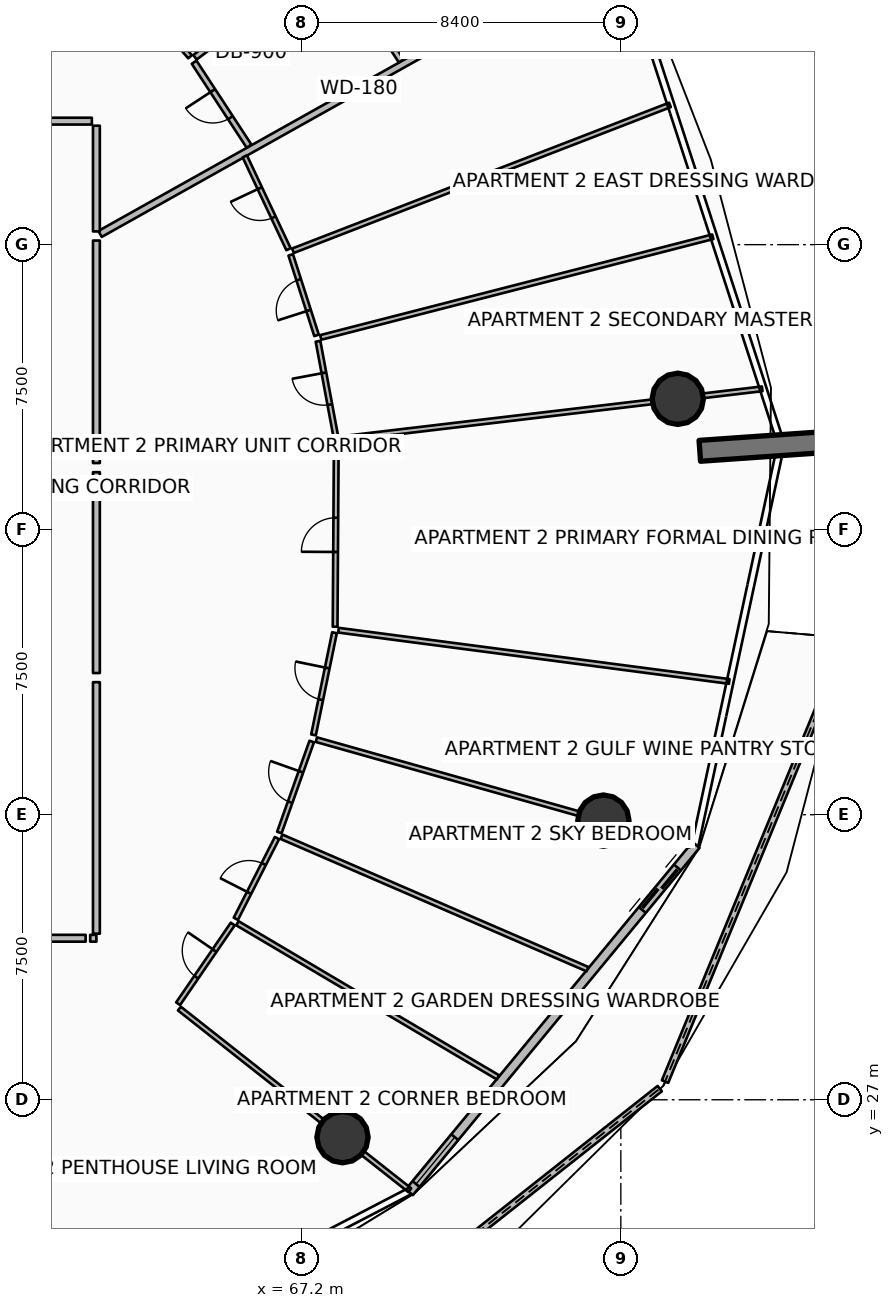
"""IFC4 building model, lengths in metres.
Left out: names, types, materials, properties, quantities, classifications, styles, units other than length and angle.
Written with IfcOpenShell. Run it as: python <this file> out.ifc"""

import sys

from ifc_helpers import new_model, si_unit, direction, frame, frame_2d, origin, origin_2d, place, context, subcontext, project, spatial, polyline, rectangle, circle, outline, extrude, element, fill, save


model = new_model("IFC4")
c1 = context("Model", 3, precision=1e-05, world=origin(), true_north=direction((0.0, 1.0)))
c2 = subcontext(c1, "Body", "Model", "MODEL_VIEW")
j1 = project(units=[si_unit("LENGTHUNIT", "METRE"), si_unit("PLANEANGLEUNIT", "RADIAN")], contexts=[c1])
p1 = place(None, origin())
s1 = spatial("IfcSite", under=j1, at=p1, CompositionType="ELEMENT")
p2 = place(p1, origin())
s2 = spatial("IfcBuilding", under=s1, at=p2, CompositionType="ELEMENT")
p3 = place(p2, frame((0.0, 0.0, 33.9)))
s3 = spatial("IfcBuildingStorey", under=s2, at=p3, CompositionType="ELEMENT", Elevation=33.9)
p4 = place(p3, frame((77.678, 44.075, 0.0), z_axis=(0.0, 0.0, 1.0), x_axis=(0.997564163539, 0.069754853754, 0.0)))
e1 = element("IfcWall", 1, at=p4, inside=s3, PredefinedType="SOLIDWALL", context=c2, shape_type="SweptSolid", body=[
    extrude(rectangle(XDim=3.5, YDim=0.55, at=frame_2d((1.75, 0.0))), origin(), (0.0, 0.0, 1.0), 3.75),
])
for number, where, z_axis, x_axis in (
    (2, (68.276, 26.016, 0.0), (0.0, 0.0, 1.0), (1.0, 0.0, 0.0)),
    (3, (75.141, 34.345, 0.0), (0.0, 0.0, 1.0), (1.0, 0.0, 0.0)),
    (4, (77.098, 45.444, 0.0), (0.0, 0.0, 1.0), (1.0, 0.0, 0.0)),
):
    element("IfcColumn", number, at=place(p3, frame(where, z_axis=z_axis, x_axis=x_axis)), inside=s3, PredefinedType="COLUMN", context=c2, shape_type="SweptSolid", body=[
        extrude(circle(Radius=0.675, at=origin_2d()), origin(), (0.0, 0.0, 1.0), 3.5),
    ])
p5 = place(p3, frame((67.172, 19.829, 0.0), z_axis=(0.0, 0.0, 1.0), x_axis=(0.784771193171, 0.619785587416, 0.0)))
e5 = element("IfcWall", 5, at=p5, inside=s3, PredefinedType="PARAPET", context=c2, shape_type="SweptSolid", body=[
    extrude(outline(polyline([(0.0, 0.0), (12.044, 0.0), (12.044, 1.832), (6.022, 1.853), (0.0, 1.756), (0.0, 0.0)])), frame((0.0, 0.09, 0.0), z_axis=(0.0, -1.0, 0.0), x_axis=(1.0, 0.0, 0.0)), (0.0, 0.0, 1.0), 0.18),
])
p6 = place(p3, frame((76.763, 27.479, 0.0), z_axis=(0.0, 0.0, 1.0), x_axis=(0.381082407016, 0.924541074838, 0.0)))
e6 = element("IfcWall", 6, at=p6, inside=s3, PredefinedType="PARAPET", context=c2, shape_type="SweptSolid", body=[
    extrude(outline(polyline([(0.0, 0.0), (12.625, 0.0), (12.625, 1.497), (6.312, 1.696), (0.0, 1.832), (0.0, 0.0)])), frame((0.0, 0.09, 0.0), z_axis=(0.0, -1.0, 0.0), x_axis=(1.0, 0.0, 0.0)), (0.0, 0.0, 1.0), 0.18),
])
p7 = place(p3, frame((70.033, 24.567, 0.0), z_axis=(0.0, 0.0, 1.0), x_axis=(0.636674332663, 0.771132799281, 0.0)))
e7 = element("IfcWall", 7, at=p7, inside=s3, PredefinedType="SOLIDWALL", context=c2, shape_type="SweptSolid", body=[
    extrude(rectangle(XDim=11.851, YDim=0.24, at=frame_2d((5.926, 0.0))), origin(), (0.0, 0.0, 1.0), 2.45),
])
p8 = place(p7, frame((9.631, 0.0, 0.0)))
e8 = element("IfcOpeningElement", 8, at=p8, cuts=e7, PredefinedType="OPENING", context=c2, shape_type="SweptSolid", body=[
    extrude(rectangle(XDim=1.45, YDim=2.15, at=frame_2d((0.725, 1.075))), frame((0.0, 0.13, 0.0), z_axis=(0.0, -1.0, 0.0), x_axis=(1.0, 0.0, 0.0)), (0.0, 0.0, 1.0), 0.26),
])
p9 = place(p7, frame((0.28, 0.0, 0.65)))
e9 = element("IfcOpeningElement", 9, at=p9, cuts=e7, PredefinedType="OPENING", context=c2, shape_type="SweptSolid", body=[
    extrude(rectangle(XDim=1.6, YDim=1.5, at=frame_2d((0.8, 0.75))), frame((0.0, 0.13, 0.0), z_axis=(0.0, -1.0, 0.0), x_axis=(1.0, 0.0, 0.0)), (0.0, 0.0, 1.0), 0.26),
])
p10 = place(p3, frame((61.896, 49.782, 0.0), z_axis=(0.0, 0.0, 1.0), x_axis=(0.872493215695, 0.488626225828, 0.0)))
e10 = element("IfcWall", 10, at=p10, inside=s3, PredefinedType="PARTITIONING", context=c2, shape_type="SweptSolid", body=[
    extrude(rectangle(XDim=15.612, YDim=0.18, at=frame_2d((7.806, 0.0))), origin(), (0.0, 0.0, 1.0), 2.867),
])
p11 = place(p3, frame((61.8, 49.848, 0.0), z_axis=(0.0, 0.0, 1.0), x_axis=(0.0, 1.0, 0.0)))
e11 = element("IfcWall", 11, at=p11, inside=s3, PredefinedType="PARTITIONING", context=c2, shape_type="SweptSolid", body=[
    extrude(rectangle(XDim=2.781, YDim=0.18, at=frame_2d((1.391, 0.0))), origin(), (0.0, 0.0, 1.0), 2.867),
])
p12 = place(p3, frame((61.68, 52.75, 0.0), z_axis=(0.0, 0.0, 1.0), x_axis=(-1.0, 0.0, 0.0)))
e12 = element("IfcWall", 12, at=p12, inside=s3, PredefinedType="PARTITIONING", context=c2, shape_type="SweptSolid", body=[
    extrude(rectangle(XDim=5.085, YDim=0.18, at=frame_2d((2.543, 0.0))), origin(), (0.0, 0.0, 1.0), 2.867),
])
p13 = place(p3, frame((65.816, 52.092, 0.0), z_axis=(0.0, 0.0, 1.0), x_axis=(-0.547635625156, 0.836716930664, 0.0)))
e13 = element("IfcWall", 13, at=p13, inside=s3, PredefinedType="PARTITIONING", context=c2, shape_type="SweptSolid", body=[
    extrude(rectangle(XDim=2.639, YDim=0.15, at=frame_2d((1.32, 0.0))), origin(), (0.0, 0.0, 1.0), 2.867),
])
p14 = place(p13, frame((0.895, 0.0, 0.0)))
e14 = element("IfcOpeningElement", 14, at=p14, cuts=e13, PredefinedType="OPENING", context=c2, shape_type="SweptSolid", body=[
    extrude(rectangle(XDim=0.85, YDim=2.06, at=frame_2d((0.425, 1.03))), frame((0.0, 0.085, 0.0), z_axis=(0.0, -1.0, 0.0), x_axis=(1.0, 0.0, 0.0)), (0.0, 0.0, 1.0), 0.17),
])
p15 = place(p3, frame((69.821, 54.335, 0.0), z_axis=(0.0, 0.0, 1.0), x_axis=(-0.547709492592, 0.836668579382, 0.0)))
e15 = element("IfcWall", 15, at=p15, inside=s3, PredefinedType="PARTITIONING", context=c2, shape_type="SweptSolid", body=[
    extrude(rectangle(XDim=3.273, YDim=0.15, at=frame_2d((1.637, 0.0))), origin(), (0.0, 0.0, 1.0), 2.867),
])
p16 = place(p3, frame((64.394, 54.43, 0.0), z_axis=(0.0, 0.0, 1.0), x_axis=(0.796855751732, 0.604169604442, 0.0)))
e16 = element("IfcWall", 16, at=p16, inside=s3, PredefinedType="PARTITIONING", context=c2, shape_type="SweptSolid", body=[
    extrude(rectangle(XDim=4.46, YDim=0.15, at=frame_2d((2.23, 0.0))), origin(), (0.0, 0.0, 1.0), 2.94),
])
p17 = place(p3, frame((64.263, 54.444, 0.0), z_axis=(0.0, 0.0, 1.0), x_axis=(-0.651227570151, 0.758882502022, 0.0)))
e17 = element("IfcWall", 17, at=p17, inside=s3, PredefinedType="PARTITIONING", context=c2, shape_type="SweptSolid", body=[
    extrude(rectangle(XDim=2.304, YDim=0.125, at=frame_2d((1.152, 0.0))), origin(), (0.0, 0.0, 1.0), 2.94),
])
p18 = place(p17, frame((0.727, 0.0, 0.0)))
e18 = element("IfcOpeningElement", 18, at=p18, cuts=e17, PredefinedType="OPENING", context=c2, shape_type="SweptSolid", body=[
    extrude(rectangle(XDim=0.85, YDim=2.06, at=frame_2d((0.425, 1.03))), frame((0.0, 0.073, 0.0), z_axis=(0.0, -1.0, 0.0), x_axis=(1.0, 0.0, 0.0)), (0.0, 0.0, 1.0), 0.145),
])
p19 = place(p3, frame((54.14, 31.25, 0.0), z_axis=(0.0, 0.0, 1.0), x_axis=(1.0, 0.0, 0.0)))
e19 = element("IfcWall", 19, at=p19, inside=s3, PredefinedType="PARTITIONING", context=c2, shape_type="SweptSolid", body=[
    extrude(rectangle(XDim=7.376, YDim=0.18, at=frame_2d((3.688, 0.0))), origin(), (0.0, 0.0, 1.0), 2.867),
])
p20 = place(p19, frame((3.138, 0.0, 0.0)))
e20 = element("IfcOpeningElement", 20, at=p20, cuts=e19, PredefinedType="OPENING", context=c2, shape_type="SweptSolid", body=[
    extrude(rectangle(XDim=1.1, YDim=2.1, at=frame_2d((0.55, 1.05))), frame((0.0, 0.1, 0.0), z_axis=(0.0, -1.0, 0.0), x_axis=(1.0, 0.0, 0.0)), (0.0, 0.0, 1.0), 0.2),
])
p21 = place(p3, frame((61.636, 31.25, 0.0), z_axis=(0.0, 0.0, 1.0), x_axis=(1.0, 0.0, 0.0)))
e21 = element("IfcWall", 21, at=p21, inside=s3, PredefinedType="PARTITIONING", context=c2, shape_type="SweptSolid", body=[
    extrude(rectangle(XDim=0.164, YDim=0.18, at=frame_2d((0.082, 0.0))), origin(), (0.0, 0.0, 1.0), 2.867),
])
p22 = place(p3, frame((61.8, 31.37, 0.0), z_axis=(0.0, 0.0, 1.0), x_axis=(0.0, 1.0, 0.0)))
e22 = element("IfcWall", 22, at=p22, inside=s3, PredefinedType="PARTITIONING", context=c2, shape_type="SweptSolid", body=[
    extrude(rectangle(XDim=6.618, YDim=0.18, at=frame_2d((3.309, 0.0))), origin(), (0.0, 0.0, 1.0), 2.867),
])
p23 = place(p3, frame((63.983, 29.4, 0.0), z_axis=(0.0, 0.0, 1.0), x_axis=(0.785322984339, -0.619086270457, 0.0)))
e23 = element("IfcWall", 23, at=p23, inside=s3, PredefinedType="PARTITIONING", context=c2, shape_type="SweptSolid", body=[
    extrude(rectangle(XDim=7.719, YDim=0.125, at=frame_2d((3.86, 0.0))), origin(), (0.0, 0.0, 1.0), 2.867),
])
p24 = place(p3, frame((65.51, 31.645, 0.0), z_axis=(0.0, 0.0, 1.0), x_axis=(0.86074163886, -0.509042072065, 0.0)))
e24 = element("IfcWall", 24, at=p24, inside=s3, PredefinedType="PARTITIONING", context=c2, shape_type="SweptSolid", body=[
    extrude(rectangle(XDim=7.968, YDim=0.125, at=frame_2d((3.984, 0.0))), origin(), (0.0, 0.0, 1.0), 2.94),
])
p25 = place(p3, frame((66.67, 33.921, 0.0), z_axis=(0.0, 0.0, 1.0), x_axis=(0.917747697885, -0.397163899451, 0.0)))
e25 = element("IfcWall", 25, at=p25, inside=s3, PredefinedType="PARTITIONING", context=c2, shape_type="SweptSolid", body=[
    extrude(rectangle(XDim=8.775, YDim=0.125, at=frame_2d((4.387, 0.0))), origin(), (0.0, 0.0, 1.0), 2.94),
])
p26 = place(p3, frame((63.95, 29.528, 0.0), z_axis=(0.0, 0.0, 1.0), x_axis=(0.565358509176, 0.824845292223, 0.0)))
e26 = element("IfcWall", 26, at=p26, inside=s3, PredefinedType="PARTITIONING", context=c2, shape_type="SweptSolid", body=[
    extrude(rectangle(XDim=2.542, YDim=0.125, at=frame_2d((1.271, 0.0))), origin(), (0.0, 0.0, 1.0), 2.867),
])
p27 = place(p26, frame((0.846, 0.0, 0.0)))
e27 = element("IfcOpeningElement", 27, at=p27, cuts=e26, PredefinedType="OPENING", context=c2, shape_type="SweptSolid", body=[
    extrude(rectangle(XDim=0.85, YDim=2.06, at=frame_2d((0.425, 1.03))), frame((0.0, 0.073, 0.0), z_axis=(0.0, -1.0, 0.0), x_axis=(1.0, 0.0, 0.0)), (0.0, 0.0, 1.0), 0.145),
])
p28 = place(p3, frame((65.469, 31.762, 0.0), z_axis=(0.0, 0.0, 1.0), x_axis=(0.45400250644, 0.891000406367, 0.0)))
e28 = element("IfcWall", 28, at=p28, inside=s3, PredefinedType="PARTITIONING", context=c2, shape_type="SweptSolid", body=[
    extrude(rectangle(XDim=2.383, YDim=0.125, at=frame_2d((1.192, 0.0))), origin(), (0.0, 0.0, 1.0), 2.94),
])
p29 = place(p28, frame((0.767, 0.0, 0.0)))
e29 = element("IfcOpeningElement", 29, at=p29, cuts=e28, PredefinedType="OPENING", context=c2, shape_type="SweptSolid", body=[
    extrude(rectangle(XDim=0.85, YDim=2.06, at=frame_2d((0.425, 1.03))), frame((0.0, 0.073, 0.0), z_axis=(0.0, -1.0, 0.0), x_axis=(1.0, 0.0, 0.0)), (0.0, 0.0, 1.0), 0.145),
])
p30 = place(p3, frame((66.614, 34.032, 0.0), z_axis=(0.0, 0.0, 1.0), x_axis=(0.335094930465, 0.942184370268, 0.0)))
e30 = element("IfcWall", 30, at=p30, inside=s3, PredefinedType="PARTITIONING", context=c2, shape_type="SweptSolid", body=[
    extrude(rectangle(XDim=2.542, YDim=0.125, at=frame_2d((1.271, 0.0))), origin(), (0.0, 0.0, 1.0), 2.867),
])
p31 = place(p30, frame((0.846, 0.0, 0.0)))
e31 = element("IfcOpeningElement", 31, at=p31, cuts=e30, PredefinedType="OPENING", context=c2, shape_type="SweptSolid", body=[
    extrude(rectangle(XDim=0.85, YDim=2.06, at=frame_2d((0.425, 1.03))), frame((0.0, 0.073, 0.0), z_axis=(0.0, -1.0, 0.0), x_axis=(1.0, 0.0, 0.0)), (0.0, 0.0, 1.0), 0.145),
])
p32 = place(p3, frame((61.8, 38.228, 0.0), z_axis=(0.0, 0.0, 1.0), x_axis=(0.0, 1.0, 0.0)))
e32 = element("IfcWall", 32, at=p32, inside=s3, PredefinedType="PARTITIONING", context=c2, shape_type="SweptSolid", body=[
    extrude(rectangle(XDim=5.285, YDim=0.18, at=frame_2d((2.643, 0.0))), origin(), (0.0, 0.0, 1.0), 2.867),
])
p33 = place(p3, frame((67.589, 36.475, 0.0), z_axis=(0.0, 0.0, 1.0), x_axis=(0.962457516126, -0.271432366627, 0.0)))
e33 = element("IfcWall", 33, at=p33, inside=s3, PredefinedType="PARTITIONING", context=c2, shape_type="SweptSolid", body=[
    extrude(rectangle(XDim=10.221, YDim=0.125, at=frame_2d((5.111, 0.0))), origin(), (0.0, 0.0, 1.0), 2.867),
])
p34 = place(p3, frame((68.17, 39.355, 0.0), z_axis=(0.0, 0.0, 1.0), x_axis=(0.991512615626, -0.130010511326, 0.0)))
e34 = element("IfcWall", 34, at=p34, inside=s3, PredefinedType="PARTITIONING", context=c2, shape_type="SweptSolid", body=[
    extrude(rectangle(XDim=10.369, YDim=0.125, at=frame_2d((5.185, 0.0))), origin(), (0.0, 0.0, 1.0), 2.94),
])
p35 = place(p3, frame((67.513, 36.601, 0.0), z_axis=(0.0, 0.0, 1.0), x_axis=(0.201246233374, 0.979540684991, 0.0)))
e35 = element("IfcWall", 35, at=p35, inside=s3, PredefinedType="PARTITIONING", context=c2, shape_type="SweptSolid", body=[
    extrude(rectangle(XDim=2.744, YDim=0.125, at=frame_2d((1.372, 0.0))), origin(), (0.0, 0.0, 1.0), 2.867),
])
p36 = place(p35, frame((0.947, 0.0, 0.0)))
e36 = element("IfcOpeningElement", 36, at=p36, cuts=e35, PredefinedType="OPENING", context=c2, shape_type="SweptSolid", body=[
    extrude(rectangle(XDim=0.85, YDim=2.06, at=frame_2d((0.425, 1.03))), frame((0.0, 0.073, 0.0), z_axis=(0.0, -1.0, 0.0), x_axis=(1.0, 0.0, 0.0)), (0.0, 0.0, 1.0), 0.145),
])
p37 = place(p3, frame((68.082, 39.447, 0.0), z_axis=(0.0, 0.0, 1.0), x_axis=(0.006313643226, 0.999980068756, 0.0)))
e37 = element("IfcWall", 37, at=p37, inside=s3, PredefinedType="PARTITIONING", context=c2, shape_type="SweptSolid", body=[
    extrude(rectangle(XDim=4.833, YDim=0.125, at=frame_2d((2.417, 0.0))), origin(), (0.0, 0.0, 1.0), 2.867),
])
p38 = place(p37, frame((1.967, 0.0, 0.0)))
e38 = element("IfcOpeningElement", 38, at=p38, cuts=e37, PredefinedType="OPENING", context=c2, shape_type="SweptSolid", body=[
    extrude(rectangle(XDim=0.9, YDim=2.08, at=frame_2d((0.45, 1.04))), frame((0.0, 0.073, 0.0), z_axis=(0.0, -1.0, 0.0), x_axis=(1.0, 0.0, 0.0)), (0.0, 0.0, 1.0), 0.145),
])
p39 = place(p3, frame((61.8, 43.753, 0.0), z_axis=(0.0, 0.0, 1.0), x_axis=(0.0, 1.0, 0.0)))
e39 = element("IfcWall", 39, at=p39, inside=s3, PredefinedType="PARTITIONING", context=c2, shape_type="SweptSolid", body=[
    extrude(rectangle(XDim=5.855, YDim=0.18, at=frame_2d((2.927, 0.0))), origin(), (0.0, 0.0, 1.0), 2.867),
])
p40 = place(p3, frame((68.212, 44.392, 0.0), z_axis=(0.0, 0.0, 1.0), x_axis=(0.993068868454, 0.117533920671, 0.0)))
e40 = element("IfcWall", 40, at=p40, inside=s3, PredefinedType="PARTITIONING", context=c2, shape_type="SweptSolid", body=[
    extrude(rectangle(XDim=11.186, YDim=0.125, at=frame_2d((5.593, 0.0))), origin(), (0.0, 0.0, 1.0), 2.867),
])
p41 = place(p3, frame((67.704, 47.059, 0.0), z_axis=(0.0, 0.0, 1.0), x_axis=(0.968581650893, 0.248695769071, 0.0)))
e41 = element("IfcWall", 41, at=p41, inside=s3, PredefinedType="PARTITIONING", context=c2, shape_type="SweptSolid", body=[
    extrude(rectangle(XDim=10.65, YDim=0.125, at=frame_2d((5.325, 0.0))), origin(), (0.0, 0.0, 1.0), 2.94),
])
p42 = place(p3, frame((66.973, 49.34, 0.0), z_axis=(0.0, 0.0, 1.0), x_axis=(0.93264336061, 0.360799614621, 0.0)))
e42 = element("IfcWall", 42, at=p42, inside=s3, PredefinedType="PARTITIONING", context=c2, shape_type="SweptSolid", body=[
    extrude(rectangle(XDim=10.636, YDim=0.125, at=frame_2d((5.318, 0.0))), origin(), (0.0, 0.0, 1.0), 2.94),
])
p43 = place(p3, frame((68.098, 44.459, 0.0), z_axis=(0.0, 0.0, 1.0), x_axis=(-0.183523097457, 0.983015397997, 0.0)))
e43 = element("IfcWall", 43, at=p43, inside=s3, PredefinedType="PARTITIONING", context=c2, shape_type="SweptSolid", body=[
    extrude(rectangle(XDim=2.542, YDim=0.125, at=frame_2d((1.271, 0.0))), origin(), (0.0, 0.0, 1.0), 2.867),
])
p44 = place(p43, frame((0.846, 0.0, 0.0)))
e44 = element("IfcOpeningElement", 44, at=p44, cuts=e43, PredefinedType="OPENING", context=c2, shape_type="SweptSolid", body=[
    extrude(rectangle(XDim=0.85, YDim=2.06, at=frame_2d((0.425, 1.03))), frame((0.0, 0.073, 0.0), z_axis=(0.0, -1.0, 0.0), x_axis=(1.0, 0.0, 0.0)), (0.0, 0.0, 1.0), 0.145),
])
p45 = place(p3, frame((67.592, 47.113, 0.0), z_axis=(0.0, 0.0, 1.0), x_axis=(-0.305309270218, 0.952253248626, 0.0)))
e45 = element("IfcWall", 45, at=p45, inside=s3, PredefinedType="PARTITIONING", context=c2, shape_type="SweptSolid", body=[
    extrude(rectangle(XDim=2.225, YDim=0.125, at=frame_2d((1.112, 0.0))), origin(), (0.0, 0.0, 1.0), 2.94),
])
p46 = place(p45, frame((0.687, 0.0, 0.0)))
e46 = element("IfcOpeningElement", 46, at=p46, cuts=e45, PredefinedType="OPENING", context=c2, shape_type="SweptSolid", body=[
    extrude(rectangle(XDim=0.85, YDim=2.06, at=frame_2d((0.425, 1.03))), frame((0.0, 0.073, 0.0), z_axis=(0.0, -1.0, 0.0), x_axis=(1.0, 0.0, 0.0)), (0.0, 0.0, 1.0), 0.145),
])
p47 = place(p3, frame((66.854, 49.38, 0.0), z_axis=(0.0, 0.0, 1.0), x_axis=(-0.425714313245, 0.904857626093, 0.0)))
e47 = element("IfcWall", 47, at=p47, inside=s3, PredefinedType="PARTITIONING", context=c2, shape_type="SweptSolid", body=[
    extrude(rectangle(XDim=2.7, YDim=0.125, at=frame_2d((1.35, 0.0))), origin(), (0.0, 0.0, 1.0), 2.867),
])
p48 = place(p47, frame((0.925, 0.0, 0.0)))
e48 = element("IfcOpeningElement", 48, at=p48, cuts=e47, PredefinedType="OPENING", context=c2, shape_type="SweptSolid", body=[
    extrude(rectangle(XDim=0.85, YDim=2.06, at=frame_2d((0.425, 1.03))), frame((0.0, 0.073, 0.0), z_axis=(0.0, -1.0, 0.0), x_axis=(1.0, 0.0, 0.0)), (0.0, 0.0, 1.0), 0.145),
])
p49 = place(p8, origin())
e49 = element("IfcDoor", 49, at=p49, inside=s3, OperationType="DOUBLE_DOOR_SLIDING", PredefinedType="DOOR", context=c2, shape_type="SweptSolid", body=[
    extrude(rectangle(XDim=1.45, YDim=2.15, at=frame_2d((0.725, 1.075))), frame((0.0, 0.025, 0.0), z_axis=(0.0, -1.0, 0.0), x_axis=(1.0, 0.0, 0.0)), (0.0, 0.0, 1.0), 0.05),
])
fill(e8, e49)
p50 = place(p9, origin())
e50 = element("IfcWindow", 50, at=p50, inside=s3, PartitioningType="SINGLE_PANEL", PredefinedType="WINDOW", context=c2, shape_type="SweptSolid", body=[
    extrude(rectangle(XDim=1.6, YDim=1.5, at=frame_2d((0.8, 0.75))), frame((0.0, 0.03, 0.0), z_axis=(0.0, -1.0, 0.0), x_axis=(1.0, 0.0, 0.0)), (0.0, 0.0, 1.0), 0.06),
])
fill(e9, e50)
p51 = place(p14, origin())
e51 = element("IfcDoor", 51, at=p51, inside=s3, OperationType="SINGLE_SWING_RIGHT", PredefinedType="DOOR", context=c2, shape_type="SweptSolid", body=[
    extrude(rectangle(XDim=0.85, YDim=2.06, at=frame_2d((0.425, 1.03))), frame((0.0, 0.025, 0.0), z_axis=(0.0, -1.0, 0.0), x_axis=(1.0, 0.0, 0.0)), (0.0, 0.0, 1.0), 0.05),
])
fill(e14, e51)
p52 = place(p27, origin())
e52 = element("IfcDoor", 52, at=p52, inside=s3, OperationType="SINGLE_SWING_RIGHT", PredefinedType="DOOR", context=c2, shape_type="SweptSolid", body=[
    extrude(rectangle(XDim=0.85, YDim=2.06, at=frame_2d((0.425, 1.03))), frame((0.0, 0.025, 0.0), z_axis=(0.0, -1.0, 0.0), x_axis=(1.0, 0.0, 0.0)), (0.0, 0.0, 1.0), 0.05),
])
fill(e27, e52)
p53 = place(p29, origin())
e53 = element("IfcDoor", 53, at=p53, inside=s3, OperationType="SINGLE_SWING_LEFT", PredefinedType="DOOR", context=c2, shape_type="SweptSolid", body=[
    extrude(rectangle(XDim=0.85, YDim=2.06, at=frame_2d((0.425, 1.03))), frame((0.0, 0.025, 0.0), z_axis=(0.0, -1.0, 0.0), x_axis=(1.0, 0.0, 0.0)), (0.0, 0.0, 1.0), 0.05),
])
fill(e29, e53)
p54 = place(p31, origin())
e54 = element("IfcDoor", 54, at=p54, inside=s3, OperationType="SINGLE_SWING_RIGHT", PredefinedType="DOOR", context=c2, shape_type="SweptSolid", body=[
    extrude(rectangle(XDim=0.85, YDim=2.06, at=frame_2d((0.425, 1.03))), frame((0.0, 0.025, 0.0), z_axis=(0.0, -1.0, 0.0), x_axis=(1.0, 0.0, 0.0)), (0.0, 0.0, 1.0), 0.05),
])
fill(e31, e54)
p55 = place(p36, origin())
e55 = element("IfcDoor", 55, at=p55, inside=s3, OperationType="SINGLE_SWING_RIGHT", PredefinedType="DOOR", context=c2, shape_type="SweptSolid", body=[
    extrude(rectangle(XDim=0.85, YDim=2.06, at=frame_2d((0.425, 1.03))), frame((0.0, 0.025, 0.0), z_axis=(0.0, -1.0, 0.0), x_axis=(1.0, 0.0, 0.0)), (0.0, 0.0, 1.0), 0.05),
])
fill(e36, e55)
p56 = place(p38, origin())
e56 = element("IfcDoor", 56, at=p56, inside=s3, OperationType="SINGLE_SWING_LEFT", PredefinedType="DOOR", context=c2, shape_type="SweptSolid", body=[
    extrude(rectangle(XDim=0.9, YDim=2.08, at=frame_2d((0.45, 1.04))), frame((0.0, 0.025, 0.0), z_axis=(0.0, -1.0, 0.0), x_axis=(1.0, 0.0, 0.0)), (0.0, 0.0, 1.0), 0.05),
])
fill(e38, e56)
p57 = place(p44, origin())
e57 = element("IfcDoor", 57, at=p57, inside=s3, OperationType="SINGLE_SWING_RIGHT", PredefinedType="DOOR", context=c2, shape_type="SweptSolid", body=[
    extrude(rectangle(XDim=0.85, YDim=2.06, at=frame_2d((0.425, 1.03))), frame((0.0, 0.025, 0.0), z_axis=(0.0, -1.0, 0.0), x_axis=(1.0, 0.0, 0.0)), (0.0, 0.0, 1.0), 0.05),
])
fill(e44, e57)
p58 = place(p46, origin())
e58 = element("IfcDoor", 58, at=p58, inside=s3, OperationType="SINGLE_SWING_LEFT", PredefinedType="DOOR", context=c2, shape_type="SweptSolid", body=[
    extrude(rectangle(XDim=0.85, YDim=2.06, at=frame_2d((0.425, 1.03))), frame((0.0, 0.025, 0.0), z_axis=(0.0, -1.0, 0.0), x_axis=(1.0, 0.0, 0.0)), (0.0, 0.0, 1.0), 0.05),
])
fill(e46, e58)
p59 = place(p48, origin())
e59 = element("IfcDoor", 59, at=p59, inside=s3, OperationType="SINGLE_SWING_RIGHT", PredefinedType="DOOR", context=c2, shape_type="SweptSolid", body=[
    extrude(rectangle(XDim=0.85, YDim=2.06, at=frame_2d((0.425, 1.03))), frame((0.0, 0.025, 0.0), z_axis=(0.0, -1.0, 0.0), x_axis=(1.0, 0.0, 0.0)), (0.0, 0.0, 1.0), 0.05),
])
fill(e48, e59)
save(model, sys.argv[1])
